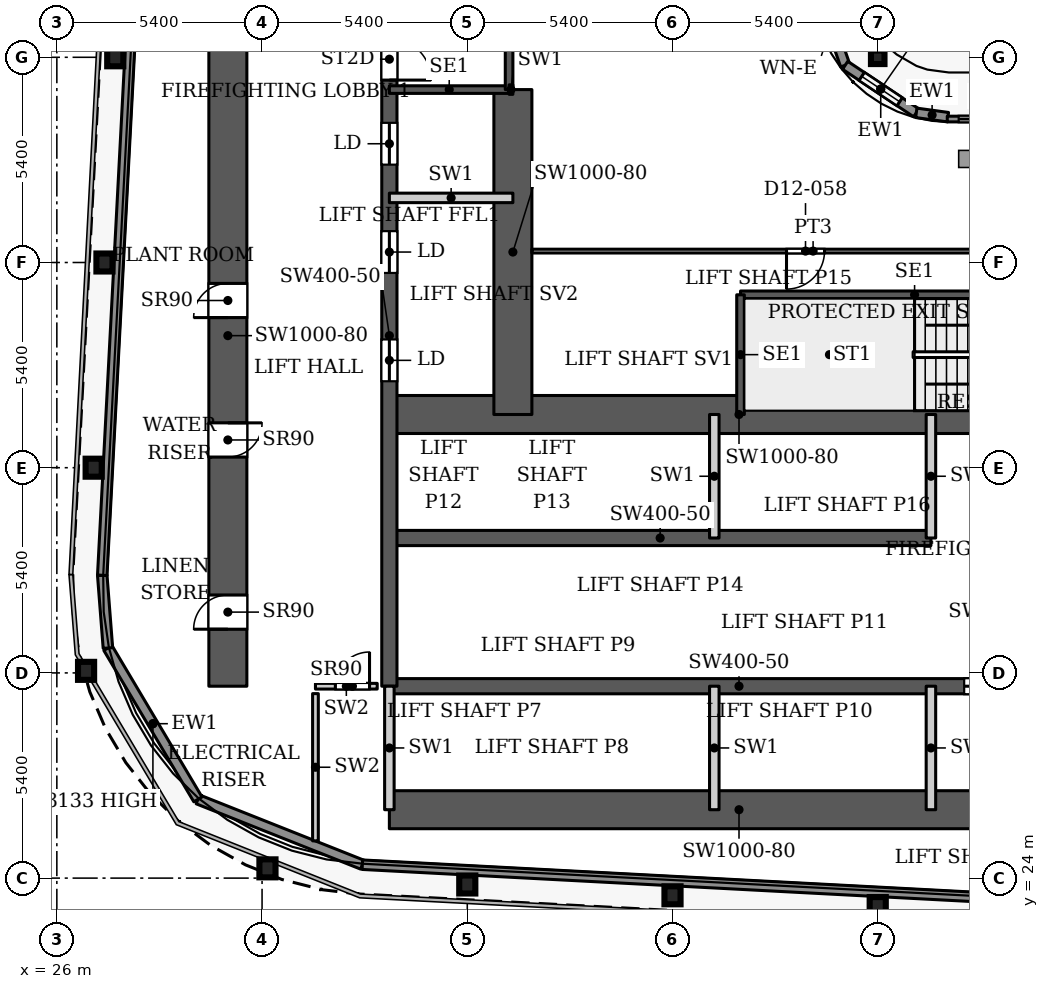
"""IFC4 building model, lengths in metres.
Left out: names, types, materials, properties, quantities, classifications, styles, units other than length and angle.
Written with IfcOpenShell. Run it as: python <this file> out.ifc"""

import sys

from ifc_helpers import new_model, si_unit, direction, frame, frame_2d, origin, origin_2d, place, context, subcontext, project, spatial, rectangle, hollow_rectangle, i_section, extrude, source, transform, mapped, element, fill, save


model = new_model("IFC4")
c1 = context("Model", 3, precision=1e-05, world=origin(), true_north=direction((0.0, 1.0)))
c2 = subcontext(c1, "Body", "Model", "MODEL_VIEW")
j1 = project(units=[si_unit("LENGTHUNIT", "METRE"), si_unit("PLANEANGLEUNIT", "RADIAN")], contexts=[c1])
p1 = place(None, origin())
s1 = spatial("IfcSite", under=j1, at=p1, CompositionType="ELEMENT")
p2 = place(p1, origin())
s2 = spatial("IfcBuilding", under=s1, at=p2, CompositionType="ELEMENT")
p3 = place(p2, frame((0.0, 0.0, 57.8)))
s3 = spatial("IfcBuildingStorey", under=s2, at=p3, CompositionType="ELEMENT", Elevation=57.8)
for number, where, z_axis, x_axis in (
    (1, (47.6, 23.264, 0.0), (0.0, 0.0, 1.0), (1.0, 0.0, 0.0)),
    (2, (42.2, 23.548, 0.0), (0.0, 0.0, 1.0), (1.0, 0.0, 0.0)),
    (3, (36.8, 23.832, 0.0), (0.0, 0.0, 1.0), (1.0, 0.0, 0.0)),
    (4, (31.542, 24.257, 0.0), (0.0, 0.0, 1.0), (1.0, 0.0, 0.0)),
    (5, (26.769, 29.454, 0.0), (0.0, 0.0, 1.0), (1.0, 0.0, 0.0)),
    (6, (26.969, 34.8, 0.0), (0.0, 0.0, 1.0), (1.0, 0.0, 0.0)),
    (7, (27.253, 40.2, 0.0), (0.0, 0.0, 1.0), (1.0, 0.0, 0.0)),
    (8, (27.537, 45.6, 0.0), (0.0, 0.0, 1.0), (1.0, 0.0, 0.0)),
):
    element("IfcColumn", number, at=place(p3, frame(where, z_axis=z_axis, x_axis=x_axis)), inside=s3, PredefinedType="COLUMN", context=c2, shape_type="SweptSolid", body=[
        extrude(i_section(OverallWidth=0.424, OverallDepth=0.474, WebThickness=0.048, FlangeThickness=0.077, FilletRadius=0.014, at=origin_2d()), origin(), (0.0, 0.0, 1.0), 3.9),
    ])
p4 = place(p3, frame((47.6, 45.6, 0.0), z_axis=(0.0, 0.0, 1.0), x_axis=(1.0, 0.0, 0.0)))
e9 = element("IfcColumn", 9, at=p4, inside=s3, PredefinedType="COLUMN", context=c2, shape_type="SweptSolid", body=[
    extrude(hollow_rectangle(XDim=0.356, YDim=0.356, WallThickness=0.016, InnerFilletRadius=0.016, OuterFilletRadius=0.032, at=origin_2d()), origin(), (0.0, 0.0, 1.0), 3.9),
])
p5 = place(p3, frame((34.75, 25.8, 0.0), z_axis=(0.0, 0.0, 1.0), x_axis=(1.0, 0.0, 0.0)))
e10 = element("IfcWall", 10, at=p5, inside=s3, PredefinedType="SHEAR", context=c2, shape_type="SweptSolid", body=[
    extrude(rectangle(XDim=18.4, YDim=1.0, at=frame_2d((9.2, 0.0))), origin(), (0.0, 0.0, 1.0), 3.9),
])
p6 = place(p3, frame((34.75, 29.05, 0.0), z_axis=(0.0, 0.0, 1.0), x_axis=(1.0, 0.0, 0.0)))
e11 = element("IfcWall", 11, at=p6, inside=s3, PredefinedType="SHEAR", context=c2, shape_type="SweptSolid", body=[
    extrude(rectangle(XDim=18.4, YDim=0.4, at=frame_2d((9.2, 0.0))), origin(), (0.0, 0.0, 1.0), 3.9),
])
p7 = place(p6, frame((15.125, 0.0, 0.0)))
e12 = element("IfcOpeningElement", 12, at=p7, cuts=e11, PredefinedType="OPENING", context=c2, shape_type="SweptSolid", body=[
    extrude(rectangle(XDim=1.1, YDim=2.2, at=frame_2d((0.55, 1.1))), frame((0.0, 0.21, 0.0), z_axis=(0.0, -1.0, 0.0), x_axis=(1.0, 0.0, 0.0)), (0.0, 0.0, 1.0), 0.42),
])
p8 = place(p3, frame((34.75, 32.95, 0.0), z_axis=(0.0, 0.0, 1.0), x_axis=(1.0, 0.0, 0.0)))
e13 = element("IfcWall", 13, at=p8, inside=s3, PredefinedType="SHEAR", context=c2, shape_type="SweptSolid", body=[
    extrude(rectangle(XDim=14.25, YDim=0.4, at=frame_2d((7.125, 0.0))), origin(), (0.0, 0.0, 1.0), 3.9),
])
p9 = place(p3, frame((34.75, 36.2, 0.0), z_axis=(0.0, 0.0, 1.0), x_axis=(1.0, 0.0, 0.0)))
e14 = element("IfcWall", 14, at=p9, inside=s3, PredefinedType="SHEAR", context=c2, shape_type="SweptSolid", body=[
    extrude(rectangle(XDim=18.4, YDim=1.0, at=frame_2d((9.2, 0.0))), origin(), (0.0, 0.0, 1.0), 3.9),
])
p10 = place(p9, frame((16.9, 0.0, 0.0)))
e15 = element("IfcOpeningElement", 15, at=p10, cuts=e14, PredefinedType="OPENING", context=c2, shape_type="SweptSolid", body=[
    extrude(rectangle(XDim=1.0, YDim=2.2, at=frame_2d((0.5, 1.1))), frame((0.0, 0.51, 0.0), z_axis=(0.0, -1.0, 0.0), x_axis=(1.0, 0.0, 0.0)), (0.0, 0.0, 1.0), 1.02),
])
p11 = place(p3, frame((34.75, 29.05, 0.0), z_axis=(0.0, 0.0, 1.0), x_axis=(0.0, 1.0, 0.0)))
e16 = element("IfcWall", 16, at=p11, inside=s3, PredefinedType="SHEAR", context=c2, shape_type="SweptSolid", body=[
    extrude(rectangle(XDim=18.45, YDim=0.4, at=frame_2d((9.225, 0.0))), origin(), (0.0, 0.0, 1.0), 3.9),
])
p12 = place(p11, frame((8.025, 0.0, 0.0)))
e17 = element("IfcOpeningElement", 17, at=p12, cuts=e16, PredefinedType="OPENING", context=c2, shape_type="SweptSolid", body=[
    extrude(rectangle(XDim=1.1, YDim=2.2, at=frame_2d((0.55, 1.1))), frame((0.0, 0.21, 0.0), z_axis=(0.0, -1.0, 0.0), x_axis=(1.0, 0.0, 0.0)), (0.0, 0.0, 1.0), 0.42),
])
p13 = place(p11, frame((10.875, 0.0, 0.0)))
e18 = element("IfcOpeningElement", 18, at=p13, cuts=e16, PredefinedType="OPENING", context=c2, shape_type="SweptSolid", body=[
    extrude(rectangle(XDim=1.1, YDim=2.2, at=frame_2d((0.55, 1.1))), frame((0.0, 0.21, 0.0), z_axis=(0.0, -1.0, 0.0), x_axis=(1.0, 0.0, 0.0)), (0.0, 0.0, 1.0), 0.42),
])
p14 = place(p11, frame((13.725, 0.0, 0.0)))
e19 = element("IfcOpeningElement", 19, at=p14, cuts=e16, PredefinedType="OPENING", context=c2, shape_type="SweptSolid", body=[
    extrude(rectangle(XDim=1.1, YDim=2.2, at=frame_2d((0.55, 1.1))), frame((0.0, 0.21, 0.0), z_axis=(0.0, -1.0, 0.0), x_axis=(1.0, 0.0, 0.0)), (0.0, 0.0, 1.0), 0.42),
])
p15 = place(p11, frame((15.95, 0.0, 0.0)))
e20 = element("IfcOpeningElement", 20, at=p15, cuts=e16, PredefinedType="OPENING", context=c2, shape_type="SweptSolid", body=[
    extrude(rectangle(XDim=1.1, YDim=2.2, at=frame_2d((0.55, 1.1))), frame((0.0, 0.21, 0.0), z_axis=(0.0, -1.0, 0.0), x_axis=(1.0, 0.0, 0.0)), (0.0, 0.0, 1.0), 0.42),
])
p16 = place(p3, frame((38.0, 36.2, 0.0), z_axis=(0.0, 0.0, 1.0), x_axis=(0.0, 1.0, 0.0)))
e21 = element("IfcWall", 21, at=p16, inside=s3, PredefinedType="SHEAR", context=c2, shape_type="SweptSolid", body=[
    extrude(rectangle(XDim=8.55, YDim=1.0, at=frame_2d((4.275, 0.0))), origin(), (0.0, 0.0, 1.0), 3.9),
])
p17 = place(p3, frame((30.5, 29.05, 0.0), z_axis=(0.0, 0.0, 1.0), x_axis=(0.0, 1.0, 0.0)))
e22 = element("IfcWall", 22, at=p17, inside=s3, PredefinedType="SHEAR", context=c2, shape_type="SweptSolid", body=[
    extrude(rectangle(XDim=18.45, YDim=1.0, at=frame_2d((9.225, 0.0))), origin(), (0.0, 0.0, 1.0), 3.9),
])
p18 = place(p17, frame((1.5, 0.0, 0.0)))
e23 = element("IfcOpeningElement", 23, at=p18, cuts=e22, PredefinedType="OPENING", context=c2, shape_type="SweptSolid", body=[
    extrude(rectangle(XDim=0.9, YDim=2.2, at=frame_2d((0.45, 1.1))), frame((0.0, 0.51, 0.0), z_axis=(0.0, -1.0, 0.0), x_axis=(1.0, 0.0, 0.0)), (0.0, 0.0, 1.0), 1.02),
])
p19 = place(p17, frame((6.03, 0.0, 0.0)))
e24 = element("IfcOpeningElement", 24, at=p19, cuts=e22, PredefinedType="OPENING", context=c2, shape_type="SweptSolid", body=[
    extrude(rectangle(XDim=0.9, YDim=2.2, at=frame_2d((0.45, 1.1))), frame((0.0, 0.51, 0.0), z_axis=(0.0, -1.0, 0.0), x_axis=(1.0, 0.0, 0.0)), (0.0, 0.0, 1.0), 1.02),
])
p20 = place(p17, frame((9.7, 0.0, 0.0)))
e25 = element("IfcOpeningElement", 25, at=p20, cuts=e22, PredefinedType="OPENING", context=c2, shape_type="SweptSolid", body=[
    extrude(rectangle(XDim=0.9, YDim=2.2, at=frame_2d((0.45, 1.1))), frame((0.0, 0.51, 0.0), z_axis=(0.0, -1.0, 0.0), x_axis=(1.0, 0.0, 0.0)), (0.0, 0.0, 1.0), 1.02),
])
p21 = place(p3, frame((34.039, 24.353, 0.0), z_axis=(0.0, 0.0, 1.0), x_axis=(-0.929352825399, 0.369192803184, 0.0)))
e26 = element("IfcWall", 26, at=p21, inside=s3, PredefinedType="SOLIDWALL", context=c2, shape_type="SweptSolid", body=[
    extrude(rectangle(XDim=4.656, YDim=0.25, at=frame_2d((2.328, 0.0))), origin(), (0.0, 0.0, 1.0), 3.75),
])
p22 = place(p3, frame((29.712, 26.072, 0.0), z_axis=(0.0, 0.0, 1.0), x_axis=(-0.511028049012, 0.859564036662, 0.0)))
e27 = element("IfcWall", 27, at=p22, inside=s3, PredefinedType="SOLIDWALL", context=c2, shape_type="SweptSolid", body=[
    extrude(rectangle(XDim=4.634, YDim=0.25, at=frame_2d((2.317, 0.0))), origin(), (0.0, 0.0, 1.0), 3.133),
])
p23 = place(p3, frame((27.344, 30.055, 0.0), z_axis=(0.0, 0.0, 1.0), x_axis=(-0.077571675317, 0.99698677784, 0.0)))
e28 = element("IfcWall", 28, at=p23, inside=s3, PredefinedType="SOLIDWALL", context=c2, shape_type="SweptSolid", body=[
    extrude(rectangle(XDim=1.92, YDim=0.25, at=frame_2d((0.96, 0.0))), origin(), (0.0, 0.0, 1.0), 3.75),
])
p24 = place(p3, frame((27.195, 31.969, 0.0), z_axis=(0.0, 0.0, 1.0), x_axis=(0.052554995867, 0.998618031286, 0.0)))
e29 = element("IfcWall", 29, at=p24, inside=s3, PredefinedType="SOLIDWALL", context=c2, shape_type="SweptSolid", body=[
    extrude(rectangle(XDim=66.787, YDim=0.25, at=frame_2d((33.394, 0.0))), origin(), (0.0, 0.0, 1.0), 3.75),
])
p25 = place(p3, frame((46.018, 47.471, 0.0), z_axis=(0.0, 0.0, 1.0), x_axis=(0.328791208903, -0.944402637093, 0.0)))
e30 = element("IfcWall", 30, at=p25, inside=s3, PredefinedType="SOLIDWALL", context=c2, shape_type="SweptSolid", body=[
    extrude(rectangle(XDim=2.205, YDim=0.25, at=frame_2d((1.102, 0.0))), origin(), (0.0, 0.0, 1.0), 3.75),
])
p26 = place(p25, frame((0.503, 0.0, 0.6)))
e31 = element("IfcOpeningElement", 31, at=p26, cuts=e30, PredefinedType="OPENING", context=c2, shape_type="SweptSolid", body=[
    extrude(rectangle(XDim=1.2, YDim=2.1, at=frame_2d((0.6, 1.05))), frame((0.0, 0.135, 0.0), z_axis=(0.0, -1.0, 0.0), x_axis=(1.0, 0.0, 0.0)), (0.0, 0.0, 1.0), 0.27),
])
p27 = place(p3, frame((46.743, 45.389, 0.0), z_axis=(0.0, 0.0, 1.0), x_axis=(0.831449265529, -0.555600682912, 0.0)))
e32 = element("IfcWall", 32, at=p27, inside=s3, PredefinedType="SOLIDWALL", context=c2, shape_type="SweptSolid", body=[
    extrude(rectangle(XDim=2.251, YDim=0.25, at=frame_2d((1.126, 0.0))), origin(), (0.0, 0.0, 1.0), 3.75),
])
p28 = place(p27, frame((0.525, 0.0, 0.6)))
e33 = element("IfcOpeningElement", 33, at=p28, cuts=e32, PredefinedType="OPENING", context=c2, shape_type="SweptSolid", body=[
    extrude(rectangle(XDim=1.2, YDim=2.1, at=frame_2d((0.6, 1.05))), frame((0.0, 0.135, 0.0), z_axis=(0.0, -1.0, 0.0), x_axis=(1.0, 0.0, 0.0)), (0.0, 0.0, 1.0), 0.27),
])
p29 = place(p3, frame((48.615, 44.138, 0.0), z_axis=(0.0, 0.0, 1.0), x_axis=(0.990741504246, -0.135761819977, 0.0)))
e34 = element("IfcWall", 34, at=p29, inside=s3, PredefinedType="SOLIDWALL", context=c2, shape_type="SweptSolid", body=[
    extrude(rectangle(XDim=0.84, YDim=0.25, at=frame_2d((0.42, 0.0))), origin(), (0.0, 0.0, 1.0), 3.75),
])
p30 = place(p3, frame((49.43, 43.975, 0.0), z_axis=(0.0, 0.0, 1.0), x_axis=(1.0, 0.0, 0.0)))
e35 = element("IfcWall", 35, at=p30, inside=s3, PredefinedType="SOLIDWALL", context=c2, shape_type="SweptSolid", body=[
    extrude(rectangle(XDim=2.4, YDim=0.15, at=frame_2d((1.2, 0.0))), origin(), (0.0, 0.0, 1.0), 3.75),
])
p31 = place(p30, frame((0.3, 0.0, 0.0)))
e36 = element("IfcOpeningElement", 36, at=p31, cuts=e35, PredefinedType="OPENING", context=c2, shape_type="SweptSolid", body=[
    extrude(rectangle(XDim=1.8, YDim=2.4, at=frame_2d((0.9, 1.2))), frame((0.0, 0.085, 0.0), z_axis=(0.0, -1.0, 0.0), x_axis=(1.0, 0.0, 0.0)), (0.0, 0.0, 1.0), 0.17),
])
p32 = place(p3, frame((100.586, 20.85, 0.0), z_axis=(0.0, 0.0, 1.0), x_axis=(-0.99861746497, 0.052565755559, 0.0)))
e37 = element("IfcWall", 37, at=p32, inside=s3, PredefinedType="SOLIDWALL", context=c2, shape_type="SweptSolid", body=[
    extrude(rectangle(XDim=66.639, YDim=0.25, at=frame_2d((33.319, 0.0))), origin(), (0.0, 0.0, 1.0), 3.75),
])
p33 = place(p3, frame((43.99, 39.35, 0.0), z_axis=(0.0, 0.0, 1.0), x_axis=(1.0, 0.0, 0.0)))
e38 = element("IfcWall", 38, at=p33, inside=s3, PredefinedType="SHEAR", context=c2, shape_type="SweptSolid", body=[
    extrude(rectangle(XDim=9.16, YDim=0.2, at=frame_2d((4.58, 0.0))), origin(), (0.0, 0.0, 1.0), 3.9),
])
p34 = place(p3, frame((43.99, 36.2, 0.0), z_axis=(0.0, 0.0, 1.0), x_axis=(0.0, 1.0, 0.0)))
e39 = element("IfcWall", 39, at=p34, inside=s3, PredefinedType="SHEAR", context=c2, shape_type="SweptSolid", body=[
    extrude(rectangle(XDim=3.15, YDim=0.2, at=frame_2d((1.575, 0.0))), origin(), (0.0, 0.0, 1.0), 3.9),
])
p35 = place(p3, frame((34.75, 44.75, 0.0), z_axis=(0.0, 0.0, 1.0), x_axis=(1.0, 0.0, 0.0)))
e40 = element("IfcWall", 40, at=p35, inside=s3, PredefinedType="SHEAR", context=c2, shape_type="SweptSolid", body=[
    extrude(rectangle(XDim=3.15, YDim=0.2, at=frame_2d((1.575, 0.0))), origin(), (0.0, 0.0, 1.0), 3.9),
])
p36 = place(p3, frame((37.9, 44.75, 0.0), z_axis=(0.0, 0.0, 1.0), x_axis=(0.0, 1.0, 0.0)))
e41 = element("IfcWall", 41, at=p36, inside=s3, PredefinedType="SHEAR", context=c2, shape_type="SweptSolid", body=[
    extrude(rectangle(XDim=9.16, YDim=0.2, at=frame_2d((4.58, 0.0))), origin(), (0.0, 0.0, 1.0), 3.9),
])
for number, where, z_axis, x_axis in (
    (42, (34.75, 25.8, 0.0), (0.0, 0.0, 1.0), (0.0, 1.0, 0.0)),
    (43, (43.3, 25.8, 0.0), (0.0, 0.0, 1.0), (0.0, 1.0, 0.0)),
    (44, (43.3, 32.95, 0.0), (0.0, 0.0, 1.0), (0.0, 1.0, 0.0)),
    (45, (49.0, 25.8, 0.0), (0.0, 0.0, 1.0), (0.0, 1.0, 0.0)),
    (46, (49.0, 32.95, 0.0), (0.0, 0.0, 1.0), (0.0, 1.0, 0.0)),
    (47, (34.75, 41.9, 0.0), (0.0, 0.0, 1.0), (1.0, 0.0, 0.0)),
):
    element("IfcWall", number, at=place(p3, frame(where, z_axis=z_axis, x_axis=x_axis)), inside=s3, PredefinedType="PARTITIONING", context=c2, shape_type="SweptSolid", body=[
        extrude(rectangle(XDim=3.25, YDim=0.25, at=frame_2d((1.625, 0.0))), origin(), (0.0, 0.0, 1.0), 3.9),
    ])
p37 = place(p3, frame((37.9, 44.75, 0.0), z_axis=(0.0, 0.0, 1.0), x_axis=(1.0, 0.0, 0.0)))
e48 = element("IfcWall", 48, at=p37, inside=s3, PredefinedType="PARTITIONING", context=c2, shape_type="SweptSolid", body=[
    extrude(rectangle(XDim=0.1, YDim=0.25, at=frame_2d((0.05, 0.0))), origin(), (0.0, 0.0, 1.0), 3.9),
])
p38 = place(p3, frame((32.805, 29.05, 0.0), z_axis=(0.0, 0.0, 1.0), x_axis=(1.0, 0.0, 0.0)))
e49 = element("IfcWall", 49, at=p38, inside=s3, PredefinedType="PARTITIONING", context=c2, shape_type="SweptSolid", body=[
    extrude(rectangle(XDim=1.625, YDim=0.15, at=frame_2d((0.812, 0.0))), origin(), (0.0, 0.0, 1.0), 3.9),
])
p39 = place(p38, frame((0.523, 0.0, 0.0)))
e50 = element("IfcOpeningElement", 50, at=p39, cuts=e49, PredefinedType="OPENING", context=c2, shape_type="SweptSolid", body=[
    extrude(rectangle(XDim=0.9, YDim=2.2, at=frame_2d((0.45, 1.1))), frame((0.0, 0.085, 0.0), z_axis=(0.0, -1.0, 0.0), x_axis=(1.0, 0.0, 0.0)), (0.0, 0.0, 1.0), 0.17),
])
p40 = place(p3, frame((32.805, 24.98, 0.0), z_axis=(0.0, 0.0, 1.0), x_axis=(0.0, 1.0, 0.0)))
e51 = element("IfcWall", 51, at=p40, inside=s3, PredefinedType="PARTITIONING", context=c2, shape_type="SweptSolid", body=[
    extrude(rectangle(XDim=3.875, YDim=0.15, at=frame_2d((1.938, 0.0))), origin(), (0.0, 0.0, 1.0), 3.9),
])
p41 = place(p3, frame((38.499, 40.5, 0.0), z_axis=(0.0, 0.0, 1.0), x_axis=(1.0, 0.0, 0.0)))
e52 = element("IfcWall", 52, at=p41, inside=s3, PredefinedType="PARTITIONING", context=c2, shape_type="SweptSolid", body=[
    extrude(rectangle(XDim=14.801, YDim=0.1, at=frame_2d((7.4, 0.0))), origin(), (0.0, 0.0, 1.0), 3.6),
])
p42 = place(p41, frame((6.701, 0.0, 0.0)))
e53 = element("IfcOpeningElement", 53, at=p42, cuts=e52, PredefinedType="OPENING", context=c2, shape_type="SweptSolid", body=[
    extrude(rectangle(XDim=1.0, YDim=2.1, at=frame_2d((0.5, 1.05))), frame((0.0, 0.06, 0.0), z_axis=(0.0, -1.0, 0.0), x_axis=(1.0, 0.0, 0.0)), (0.0, 0.0, 1.0), 0.12),
])
m1 = source(origin(), c2, "Body", "SweptSolid", [
    extrude(rectangle(XDim=1.2, YDim=2.1, at=frame_2d((0.6, 1.05))), frame((0.0, 0.03, 0.0), z_axis=(0.0, -1.0, 0.0), x_axis=(1.0, 0.0, 0.0)), (0.0, 0.0, 1.0), 0.06),
])
p43 = place(p28, origin())
e54 = element("IfcWindow", 54, at=p43, inside=s3, PartitioningType="SINGLE_PANEL", PredefinedType="WINDOW", context=c2, shape_type="MappedRepresentation", body=[
    mapped(m1, transform((0.0, 0.0, 0.0), x_axis=(1.0, 0.0, 0.0), y_axis=(0.0, 1.0, 0.0), z_axis=(0.0, 0.0, 1.0), scale=1.0)),
])
fill(e33, e54)
m2 = source(origin(), c2, "Body", "SweptSolid", [
    extrude(rectangle(XDim=1.8, YDim=2.4, at=frame_2d((0.9, 1.2))), frame((0.0, 0.025, 0.0), z_axis=(0.0, -1.0, 0.0), x_axis=(1.0, 0.0, 0.0)), (0.0, 0.0, 1.0), 0.05),
])
p44 = place(p31, origin())
e55 = element("IfcDoor", 55, at=p44, inside=s3, OperationType="SLIDING_TO_LEFT", PredefinedType="DOOR", context=c2, shape_type="MappedRepresentation", body=[
    mapped(m2, transform((0.0, 0.0, 0.0), x_axis=(1.0, 0.0, 0.0), y_axis=(0.0, 1.0, 0.0), z_axis=(0.0, 0.0, 1.0), scale=1.0)),
])
fill(e36, e55)
m3 = source(origin(), c2, "Body", "SweptSolid", [
    extrude(rectangle(XDim=1.1, YDim=2.2, at=frame_2d((0.55, 1.1))), frame((0.0, 0.025, 0.0), z_axis=(0.0, -1.0, 0.0), x_axis=(1.0, 0.0, 0.0)), (0.0, 0.0, 1.0), 0.05),
])
p45 = place(p12, origin())
e56 = element("IfcDoor", 56, at=p45, inside=s3, OperationType="SLIDING_TO_LEFT", PredefinedType="DOOR", context=c2, shape_type="MappedRepresentation", body=[
    mapped(m3, transform((0.0, 0.0, 0.0), x_axis=(1.0, 0.0, 0.0), y_axis=(0.0, 1.0, 0.0), z_axis=(0.0, 0.0, 1.0), scale=1.0)),
])
fill(e17, e56)
p46 = place(p13, origin())
e57 = element("IfcDoor", 57, at=p46, inside=s3, OperationType="SLIDING_TO_LEFT", PredefinedType="DOOR", context=c2, shape_type="MappedRepresentation", body=[
    mapped(m3, transform((0.0, 0.0, 0.0), x_axis=(1.0, 0.0, 0.0), y_axis=(0.0, 1.0, 0.0), z_axis=(0.0, 0.0, 1.0), scale=1.0)),
])
fill(e18, e57)
p47 = place(p14, origin())
e58 = element("IfcDoor", 58, at=p47, inside=s3, OperationType="SLIDING_TO_LEFT", PredefinedType="DOOR", context=c2, shape_type="MappedRepresentation", body=[
    mapped(m3, transform((0.0, 0.0, 0.0), x_axis=(1.0, 0.0, 0.0), y_axis=(0.0, 1.0, 0.0), z_axis=(0.0, 0.0, 1.0), scale=1.0)),
])
fill(e19, e58)
p48 = place(p7, origin())
e59 = element("IfcDoor", 59, at=p48, inside=s3, OperationType="SLIDING_TO_LEFT", PredefinedType="DOOR", context=c2, shape_type="MappedRepresentation", body=[
    mapped(m3, transform((0.0, 0.0, 0.0), x_axis=(1.0, 0.0, 0.0), y_axis=(0.0, 1.0, 0.0), z_axis=(0.0, 0.0, 1.0), scale=1.0)),
])
fill(e12, e59)
m4 = source(origin(), c2, "Body", "SweptSolid", [
    extrude(rectangle(XDim=0.9, YDim=2.2, at=frame_2d((0.45, 1.1))), frame((0.0, 0.025, 0.0), z_axis=(0.0, -1.0, 0.0), x_axis=(1.0, 0.0, 0.0)), (0.0, 0.0, 1.0), 0.05),
])
p49 = place(p18, origin())
e60 = element("IfcDoor", 60, at=p49, inside=s3, OperationType="SINGLE_SWING_LEFT", PredefinedType="DOOR", context=c2, shape_type="MappedRepresentation", body=[
    mapped(m4, transform((0.0, 0.0, 0.0), x_axis=(1.0, 0.0, 0.0), y_axis=(0.0, 1.0, 0.0), z_axis=(0.0, 0.0, 1.0), scale=1.0)),
])
fill(e23, e60)
p50 = place(p19, origin())
e61 = element("IfcDoor", 61, at=p50, inside=s3, OperationType="SINGLE_SWING_RIGHT", PredefinedType="DOOR", context=c2, shape_type="MappedRepresentation", body=[
    mapped(m4, transform((0.0, 0.0, 0.0), x_axis=(1.0, 0.0, 0.0), y_axis=(0.0, 1.0, 0.0), z_axis=(0.0, 0.0, 1.0), scale=1.0)),
])
fill(e24, e61)
p51 = place(p20, origin())
e62 = element("IfcDoor", 62, at=p51, inside=s3, OperationType="SINGLE_SWING_LEFT", PredefinedType="DOOR", context=c2, shape_type="MappedRepresentation", body=[
    mapped(m4, transform((0.0, 0.0, 0.0), x_axis=(1.0, 0.0, 0.0), y_axis=(0.0, 1.0, 0.0), z_axis=(0.0, 0.0, 1.0), scale=1.0)),
])
fill(e25, e62)
p52 = place(p39, origin())
e63 = element("IfcDoor", 63, at=p52, inside=s3, OperationType="SINGLE_SWING_LEFT", PredefinedType="DOOR", context=c2, shape_type="MappedRepresentation", body=[
    mapped(m4, transform((0.0, 0.0, 0.0), x_axis=(1.0, 0.0, 0.0), y_axis=(0.0, 1.0, 0.0), z_axis=(0.0, 0.0, 1.0), scale=1.0)),
])
fill(e50, e63)
m5 = source(origin(), c2, "Body", "SweptSolid", [
    extrude(rectangle(XDim=1.1, YDim=2.2, at=frame_2d((0.55, 1.1))), frame((0.0, 0.025, 0.0), z_axis=(0.0, -1.0, 0.0), x_axis=(1.0, 0.0, 0.0)), (0.0, 0.0, 1.0), 0.05),
])
p53 = place(p15, origin())
e64 = element("IfcDoor", 64, at=p53, inside=s3, OperationType="SINGLE_SWING_RIGHT", PredefinedType="DOOR", context=c2, shape_type="MappedRepresentation", body=[
    mapped(m5, transform((0.0, 0.0, 0.0), x_axis=(1.0, 0.0, 0.0), y_axis=(0.0, 1.0, 0.0), z_axis=(0.0, 0.0, 1.0), scale=1.0)),
])
fill(e20, e64)
m6 = source(origin(), c2, "Body", "SweptSolid", [
    extrude(rectangle(XDim=1.0, YDim=2.1, at=frame_2d((0.5, 1.05))), frame((0.0, 0.025, 0.0), z_axis=(0.0, -1.0, 0.0), x_axis=(1.0, 0.0, 0.0)), (0.0, 0.0, 1.0), 0.05),
])
p54 = place(p42, origin())
e65 = element("IfcDoor", 65, at=p54, inside=s3, OperationType="SINGLE_SWING_RIGHT", PredefinedType="DOOR", context=c2, shape_type="MappedRepresentation", body=[
    mapped(m6, transform((0.0, 0.0, 0.0), x_axis=(1.0, 0.0, 0.0), y_axis=(0.0, 1.0, 0.0), z_axis=(0.0, 0.0, 1.0), scale=1.0)),
])
fill(e53, e65)
save(model, sys.argv[1])
